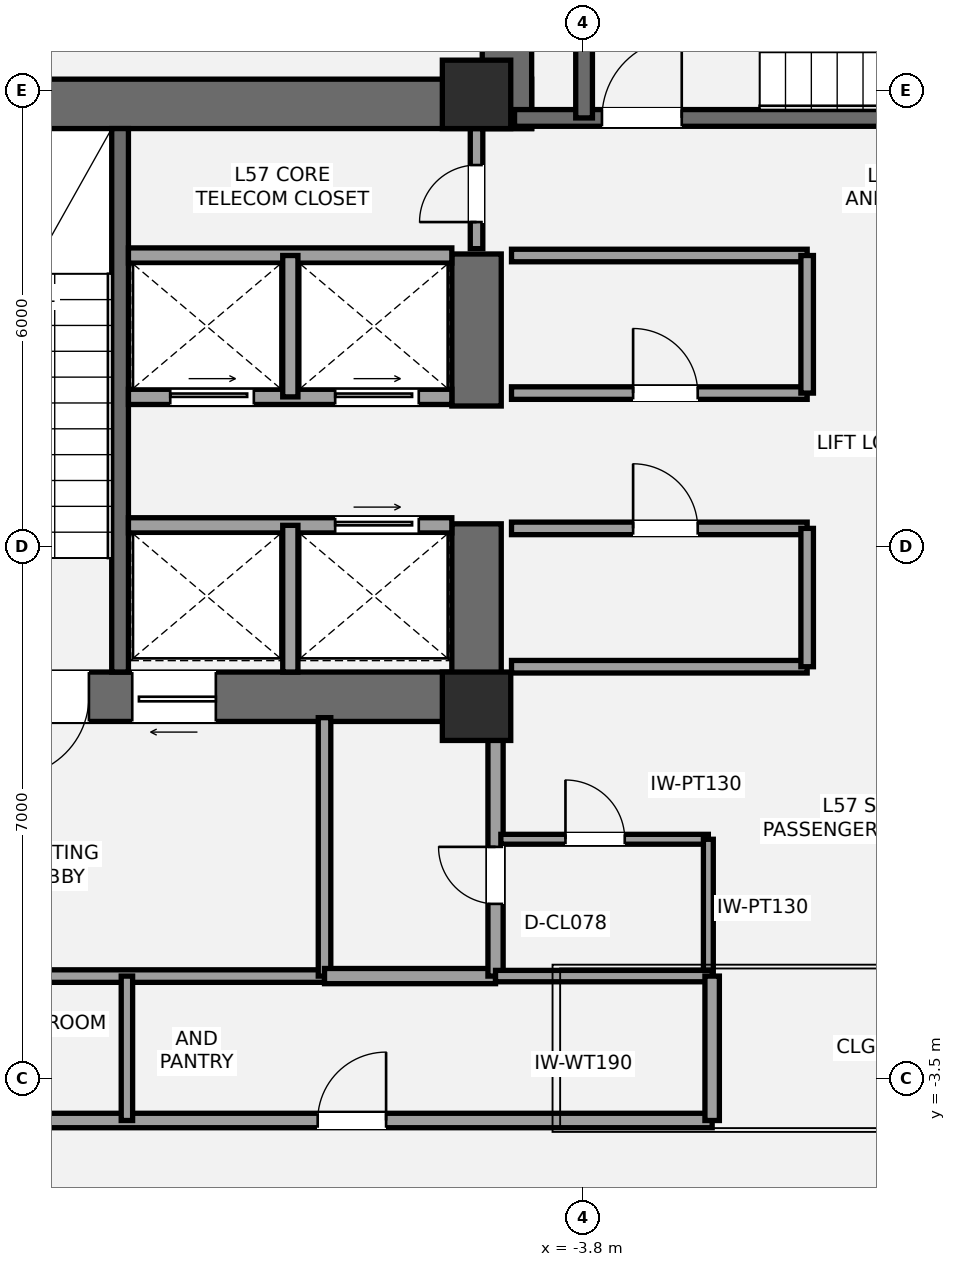
"""IFC4 building model, lengths in metres.
Left out: names, types, materials, properties, quantities, classifications, styles, units other than length and angle.
Written with IfcOpenShell. Run it as: python <this file> out.ifc"""

import sys

from ifc_helpers import new_model, si_unit, direction, frame, frame_2d, origin, origin_2d, place, context, subcontext, project, spatial, rectangle, extrude, element, fill, save


model = new_model("IFC4")
c1 = context("Model", 3, precision=1e-05, world=origin(), true_north=direction((0.0, 1.0)))
c2 = subcontext(c1, "Body", "Model", "MODEL_VIEW")
j1 = project(units=[si_unit("LENGTHUNIT", "METRE"), si_unit("PLANEANGLEUNIT", "RADIAN")], contexts=[c1])
p1 = place(None, origin())
s1 = spatial("IfcSite", under=j1, at=p1, CompositionType="ELEMENT")
p2 = place(p1, origin())
s2 = spatial("IfcBuilding", under=s1, at=p2, CompositionType="ELEMENT")
p3 = place(p2, frame((0.0, 0.0, 205.9)))
s3 = spatial("IfcBuildingStorey", under=s2, at=p3, CompositionType="ELEMENT", Elevation=205.9)
p4 = place(p3, frame((-13.8, 9.325, 0.0), z_axis=(0.0, 0.0, 1.0), x_axis=(1.0, 0.0, 0.0)))
e1 = element("IfcWall", 1, at=p4, inside=s3, PredefinedType="SHEAR", context=c2, shape_type="SweptSolid", body=[
    extrude(rectangle(XDim=9.325, YDim=0.65, at=frame_2d((4.663, 0.0))), origin(), (0.0, 0.0, 1.0), 4.1),
])
p5 = place(p3, frame((-4.875, 1.525, 0.0), z_axis=(0.0, 0.0, 1.0), x_axis=(-1.0, 0.0, 0.0)))
e2 = element("IfcWall", 2, at=p5, inside=s3, PredefinedType="SHEAR", context=c2, shape_type="SweptSolid", body=[
    extrude(rectangle(XDim=8.925, YDim=0.65, at=frame_2d((4.462, 0.0))), origin(), (0.0, 0.0, 1.0), 4.1),
])
p6 = place(p5, frame((5.425, 0.0, 0.0)))
e3 = element("IfcOpeningElement", 3, at=p6, cuts=e2, PredefinedType="OPENING", context=c2, shape_type="SweptSolid", body=[
    extrude(rectangle(XDim=1.05, YDim=2.15, at=frame_2d((0.525, 1.075))), frame((0.0, 0.335, 0.0), z_axis=(0.0, -1.0, 0.0), x_axis=(1.0, 0.0, 0.0)), (0.0, 0.0, 1.0), 0.67),
])
p7 = place(p5, frame((3.755, 0.0, 0.0)))
e4 = element("IfcOpeningElement", 4, at=p7, cuts=e2, PredefinedType="OPENING", context=c2, shape_type="SweptSolid", body=[
    extrude(rectangle(XDim=1.1, YDim=2.2, at=frame_2d((0.55, 1.1))), frame((0.0, 0.335, 0.0), z_axis=(0.0, -1.0, 0.0), x_axis=(1.0, 0.0, 0.0)), (0.0, 0.0, 1.0), 0.67),
])
p8 = place(p3, frame((-5.2, 1.2, 0.0), z_axis=(0.0, 0.0, 1.0), x_axis=(0.0, 1.0, 0.0)))
e5 = element("IfcWall", 5, at=p8, inside=s3, PredefinedType="SHEAR", context=c2, shape_type="SweptSolid", body=[
    extrude(rectangle(XDim=2.6, YDim=0.65, at=frame_2d((1.3, 0.0))), origin(), (0.0, 0.0, 1.0), 4.1),
])
p9 = place(p3, frame((-5.2, 5.35, 0.0), z_axis=(0.0, 0.0, 1.0), x_axis=(0.0, 1.0, 0.0)))
e6 = element("IfcWall", 6, at=p9, inside=s3, PredefinedType="SHEAR", context=c2, shape_type="SweptSolid", body=[
    extrude(rectangle(XDim=2.0, YDim=0.65, at=frame_2d((1.0, 0.0))), origin(), (0.0, 0.0, 1.0), 4.1),
])
p10 = place(p3, frame((-9.89, 1.85, 0.0), z_axis=(0.0, 0.0, 1.0), x_axis=(0.0, 1.0, 0.0)))
e7 = element("IfcWall", 7, at=p10, inside=s3, PredefinedType="SHEAR", context=c2, shape_type="SweptSolid", body=[
    extrude(rectangle(XDim=7.15, YDim=0.22, at=frame_2d((3.575, 0.0))), origin(), (0.0, 0.0, 1.0), 4.1),
])
p11 = place(p3, frame((-4.8, 9.0, 0.0), z_axis=(0.0, 0.0, 1.0), x_axis=(0.0, 1.0, 0.0)))
e8 = element("IfcWall", 8, at=p11, inside=s3, PredefinedType="SHEAR", context=c2, shape_type="SweptSolid", body=[
    extrude(rectangle(XDim=4.05, YDim=0.65, at=frame_2d((2.025, 0.0))), origin(), (0.0, 0.0, 1.0), 4.1),
])
p12 = place(p3, frame((-4.7, 9.14, 0.0), z_axis=(0.0, 0.0, 1.0), x_axis=(1.0, 0.0, 0.0)))
e9 = element("IfcWall", 9, at=p12, inside=s3, PredefinedType="SHEAR", context=c2, shape_type="SweptSolid", body=[
    extrude(rectangle(XDim=9.3, YDim=0.22, at=frame_2d((4.65, 0.0))), origin(), (0.0, 0.0, 1.0), 4.1),
])
p13 = place(p12, frame((1.15, 0.0, 0.0)))
e10 = element("IfcOpeningElement", 10, at=p13, cuts=e9, PredefinedType="OPENING", context=c2, shape_type="SweptSolid", body=[
    extrude(rectangle(XDim=1.05, YDim=2.15, at=frame_2d((0.525, 1.075))), frame((0.0, 0.12, 0.0), z_axis=(0.0, -1.0, 0.0), x_axis=(1.0, 0.0, 0.0)), (0.0, 0.0, 1.0), 0.24),
])
p14 = place(p3, frame((-3.785, 9.14, 0.0), z_axis=(0.0, 0.0, 1.0), x_axis=(0.0, 1.0, 0.0)))
e11 = element("IfcWall", 11, at=p14, inside=s3, PredefinedType="SHEAR", context=c2, shape_type="SweptSolid", body=[
    extrude(rectangle(XDim=3.26, YDim=0.22, at=frame_2d((1.63, 0.0))), origin(), (0.0, 0.0, 1.0), 4.1),
])
for number, where, z_axis, x_axis in (
    (12, (-5.2, 1.4, 0.0), (0.0, 0.0, 1.0), (1.0, 0.0, 0.0)),
    (13, (-5.2, 9.45, 0.0), (0.0, 0.0, 1.0), (1.0, 0.0, 0.0)),
):
    element("IfcColumn", number, at=place(p3, frame(where, z_axis=z_axis, x_axis=x_axis)), inside=s3, PredefinedType="COLUMN", context=c2, shape_type="SweptSolid", body=[
        extrude(rectangle(XDim=0.9, YDim=0.9, at=origin_2d()), origin(), (0.0, 0.0, 1.0), 4.1),
    ])
p15 = place(p3, frame((-13.45, -2.15, 0.0), z_axis=(0.0, 0.0, 1.0), x_axis=(1.0, 0.0, 0.0)))
e14 = element("IfcWall", 14, at=p15, inside=s3, PredefinedType="PARTITIONING", context=c2, shape_type="SweptSolid", body=[
    extrude(rectangle(XDim=6.25, YDim=0.165, at=frame_2d((3.125, 0.0))), origin(), (0.0, 0.0, 1.0), 3.373),
])
p16 = place(p3, frame((-7.2, -2.15, 0.0), z_axis=(0.0, 0.0, 1.0), x_axis=(0.0, 1.0, 0.0)))
e15 = element("IfcWall", 15, at=p16, inside=s3, PredefinedType="PARTITIONING", context=c2, shape_type="SweptSolid", body=[
    extrude(rectangle(XDim=3.4, YDim=0.165, at=frame_2d((1.7, 0.0))), origin(), (0.0, 0.0, 1.0), 3.373),
])
p17 = place(p3, frame((-7.2, -2.15, 0.0), z_axis=(0.0, 0.0, 1.0), x_axis=(1.0, 0.0, 0.0)))
e16 = element("IfcWall", 16, at=p17, inside=s3, PredefinedType="SOLIDWALL", context=c2, shape_type="SweptSolid", body=[
    extrude(rectangle(XDim=2.25, YDim=0.2, at=frame_2d((1.125, 0.0))), origin(), (0.0, 0.0, 1.0), 3.373),
])
p18 = place(p3, frame((-4.95, -2.15, 0.0), z_axis=(0.0, 0.0, 1.0), x_axis=(0.0, 1.0, 0.0)))
e17 = element("IfcWall", 17, at=p18, inside=s3, PredefinedType="SOLIDWALL", context=c2, shape_type="SweptSolid", body=[
    extrude(rectangle(XDim=3.4, YDim=0.2, at=frame_2d((1.7, 0.0))), origin(), (0.0, 0.0, 1.0), 3.373),
])
p19 = place(p18, frame((0.95, 0.0, 0.0)))
e18 = element("IfcOpeningElement", 18, at=p19, cuts=e17, PredefinedType="OPENING", context=c2, shape_type="SweptSolid", body=[
    extrude(rectangle(XDim=0.75, YDim=2.1, at=frame_2d((0.375, 1.05))), frame((0.0, 0.11, 0.0), z_axis=(0.0, -1.0, 0.0), x_axis=(1.0, 0.0, 0.0)), (0.0, 0.0, 1.0), 0.22),
])
p20 = place(p3, frame((-4.88, -0.35, 0.0), z_axis=(0.0, 0.0, 1.0), x_axis=(1.0, 0.0, 0.0)))
e19 = element("IfcWall", 19, at=p20, inside=s3, PredefinedType="PARTITIONING", context=c2, shape_type="SweptSolid", body=[
    extrude(rectangle(XDim=2.73, YDim=0.13, at=frame_2d((1.365, 0.0))), origin(), (0.0, 0.0, 1.0), 3.373),
])
p21 = place(p20, frame((0.85, 0.0, 0.0)))
e20 = element("IfcOpeningElement", 20, at=p21, cuts=e19, PredefinedType="OPENING", context=c2, shape_type="SweptSolid", body=[
    extrude(rectangle(XDim=0.78, YDim=2.1, at=frame_2d((0.39, 1.05))), frame((0.0, 0.075, 0.0), z_axis=(0.0, -1.0, 0.0), x_axis=(1.0, 0.0, 0.0)), (0.0, 0.0, 1.0), 0.15),
])
p22 = place(p3, frame((-2.15, -2.15, 0.0), z_axis=(0.0, 0.0, 1.0), x_axis=(0.0, 1.0, 0.0)))
e21 = element("IfcWall", 21, at=p22, inside=s3, PredefinedType="PARTITIONING", context=c2, shape_type="SweptSolid", body=[
    extrude(rectangle(XDim=1.8, YDim=0.13, at=frame_2d((0.9, 0.0))), origin(), (0.0, 0.0, 1.0), 3.92),
])
p23 = place(p3, frame((-9.78, 3.78, 0.0), z_axis=(0.0, 0.0, 1.0), x_axis=(1.0, 0.0, 0.0)))
e22 = element("IfcWall", 22, at=p23, inside=s3, PredefinedType="SOLIDWALL", context=c2, shape_type="SweptSolid", body=[
    extrude(rectangle(XDim=4.255, YDim=0.2, at=frame_2d((2.127, 0.0))), origin(), (0.0, 0.0, 1.0), 3.92),
])
p24 = place(p23, frame((2.72, 0.0, 0.0)))
e23 = element("IfcOpeningElement", 23, at=p24, cuts=e22, PredefinedType="OPENING", context=c2, shape_type="SweptSolid", body=[
    extrude(rectangle(XDim=1.1, YDim=2.2, at=frame_2d((0.55, 1.1))), frame((0.0, 0.11, 0.0), z_axis=(0.0, -1.0, 0.0), x_axis=(1.0, 0.0, 0.0)), (0.0, 0.0, 1.0), 0.22),
])
p25 = place(p3, frame((-7.65, 1.85, 0.0), z_axis=(0.0, 0.0, 1.0), x_axis=(0.0, 1.0, 0.0)))
e24 = element("IfcWall", 24, at=p25, inside=s3, PredefinedType="SOLIDWALL", context=c2, shape_type="SweptSolid", body=[
    extrude(rectangle(XDim=1.93, YDim=0.2, at=frame_2d((0.965, 0.0))), origin(), (0.0, 0.0, 1.0), 3.92),
])
p26 = place(p3, frame((-9.78, 5.47, 0.0), z_axis=(0.0, 0.0, 1.0), x_axis=(1.0, 0.0, 0.0)))
e25 = element("IfcWall", 25, at=p26, inside=s3, PredefinedType="SOLIDWALL", context=c2, shape_type="SweptSolid", body=[
    extrude(rectangle(XDim=4.255, YDim=0.2, at=frame_2d((2.127, 0.0))), origin(), (0.0, 0.0, 1.0), 3.92),
])
p27 = place(p26, frame((0.55, 0.0, 0.0)))
e26 = element("IfcOpeningElement", 26, at=p27, cuts=e25, PredefinedType="OPENING", context=c2, shape_type="SweptSolid", body=[
    extrude(rectangle(XDim=1.1, YDim=2.2, at=frame_2d((0.55, 1.1))), frame((0.0, 0.11, 0.0), z_axis=(0.0, -1.0, 0.0), x_axis=(1.0, 0.0, 0.0)), (0.0, 0.0, 1.0), 0.22),
])
p28 = place(p26, frame((2.72, 0.0, 0.0)))
e27 = element("IfcOpeningElement", 27, at=p28, cuts=e25, PredefinedType="OPENING", context=c2, shape_type="SweptSolid", body=[
    extrude(rectangle(XDim=1.1, YDim=2.2, at=frame_2d((0.55, 1.1))), frame((0.0, 0.11, 0.0), z_axis=(0.0, -1.0, 0.0), x_axis=(1.0, 0.0, 0.0)), (0.0, 0.0, 1.0), 0.22),
])
p29 = place(p3, frame((-9.78, 7.33, 0.0), z_axis=(0.0, 0.0, 1.0), x_axis=(1.0, 0.0, 0.0)))
e28 = element("IfcWall", 28, at=p29, inside=s3, PredefinedType="SOLIDWALL", context=c2, shape_type="SweptSolid", body=[
    extrude(rectangle(XDim=4.255, YDim=0.2, at=frame_2d((2.127, 0.0))), origin(), (0.0, 0.0, 1.0), 3.92),
])
p30 = place(p3, frame((-7.65, 5.47, 0.0), z_axis=(0.0, 0.0, 1.0), x_axis=(0.0, 1.0, 0.0)))
e29 = element("IfcWall", 29, at=p30, inside=s3, PredefinedType="SOLIDWALL", context=c2, shape_type="SweptSolid", body=[
    extrude(rectangle(XDim=1.86, YDim=0.2, at=frame_2d((0.93, 0.0))), origin(), (0.0, 0.0, 1.0), 3.92),
])
p31 = place(p3, frame((-4.74, 1.92, 0.0), z_axis=(0.0, 0.0, 1.0), x_axis=(1.0, 0.0, 0.0)))
e30 = element("IfcWall", 30, at=p31, inside=s3, PredefinedType="PARTITIONING", context=c2, shape_type="SweptSolid", body=[
    extrude(rectangle(XDim=3.89, YDim=0.165, at=frame_2d((1.945, 0.0))), origin(), (0.0, 0.0, 1.0), 3.06),
])
p32 = place(p3, frame((-4.74, 3.74, 0.0), z_axis=(0.0, 0.0, 1.0), x_axis=(1.0, 0.0, 0.0)))
e31 = element("IfcWall", 31, at=p32, inside=s3, PredefinedType="PARTITIONING", context=c2, shape_type="SweptSolid", body=[
    extrude(rectangle(XDim=3.89, YDim=0.165, at=frame_2d((1.945, 0.0))), origin(), (0.0, 0.0, 1.0), 3.92),
])
p33 = place(p32, frame((1.6, 0.0, 0.0)))
e32 = element("IfcOpeningElement", 32, at=p33, cuts=e31, PredefinedType="OPENING", context=c2, shape_type="SweptSolid", body=[
    extrude(rectangle(XDim=0.85, YDim=2.1, at=frame_2d((0.425, 1.05))), frame((0.0, 0.093, 0.0), z_axis=(0.0, -1.0, 0.0), x_axis=(1.0, 0.0, 0.0)), (0.0, 0.0, 1.0), 0.185),
])
p34 = place(p3, frame((-0.85, 1.92, 0.0), z_axis=(0.0, 0.0, 1.0), x_axis=(0.0, 1.0, 0.0)))
e33 = element("IfcWall", 33, at=p34, inside=s3, PredefinedType="PARTITIONING", context=c2, shape_type="SweptSolid", body=[
    extrude(rectangle(XDim=1.82, YDim=0.165, at=frame_2d((0.91, 0.0))), origin(), (0.0, 0.0, 1.0), 3.92),
])
p35 = place(p3, frame((-4.74, 5.52, 0.0), z_axis=(0.0, 0.0, 1.0), x_axis=(1.0, 0.0, 0.0)))
e34 = element("IfcWall", 34, at=p35, inside=s3, PredefinedType="PARTITIONING", context=c2, shape_type="SweptSolid", body=[
    extrude(rectangle(XDim=3.89, YDim=0.165, at=frame_2d((1.945, 0.0))), origin(), (0.0, 0.0, 1.0), 3.92),
])
p36 = place(p35, frame((1.6, 0.0, 0.0)))
e35 = element("IfcOpeningElement", 35, at=p36, cuts=e34, PredefinedType="OPENING", context=c2, shape_type="SweptSolid", body=[
    extrude(rectangle(XDim=0.85, YDim=2.1, at=frame_2d((0.425, 1.05))), frame((0.0, 0.093, 0.0), z_axis=(0.0, -1.0, 0.0), x_axis=(1.0, 0.0, 0.0)), (0.0, 0.0, 1.0), 0.185),
])
p37 = place(p3, frame((-4.74, 7.33, 0.0), z_axis=(0.0, 0.0, 1.0), x_axis=(1.0, 0.0, 0.0)))
e36 = element("IfcWall", 36, at=p37, inside=s3, PredefinedType="PARTITIONING", context=c2, shape_type="SweptSolid", body=[
    extrude(rectangle(XDim=3.89, YDim=0.165, at=frame_2d((1.945, 0.0))), origin(), (0.0, 0.0, 1.0), 3.92),
])
p38 = place(p3, frame((-0.85, 5.52, 0.0), z_axis=(0.0, 0.0, 1.0), x_axis=(0.0, 1.0, 0.0)))
e37 = element("IfcWall", 37, at=p38, inside=s3, PredefinedType="PARTITIONING", context=c2, shape_type="SweptSolid", body=[
    extrude(rectangle(XDim=1.81, YDim=0.165, at=frame_2d((0.905, 0.0))), origin(), (0.0, 0.0, 1.0), 3.92),
])
p39 = place(p3, frame((-5.2, 7.42, 0.0), z_axis=(0.0, 0.0, 1.0), x_axis=(0.0, 1.0, 0.0)))
e38 = element("IfcWall", 38, at=p39, inside=s3, PredefinedType="PARTITIONING", context=c2, shape_type="SweptSolid", body=[
    extrude(rectangle(XDim=1.58, YDim=0.165, at=frame_2d((0.79, 0.0))), origin(), (0.0, 0.0, 1.0), 3.92),
])
p40 = place(p39, frame((0.35, 0.0, 0.0)))
e39 = element("IfcOpeningElement", 39, at=p40, cuts=e38, PredefinedType="OPENING", context=c2, shape_type="SweptSolid", body=[
    extrude(rectangle(XDim=0.75, YDim=2.1, at=frame_2d((0.375, 1.05))), frame((0.0, 0.093, 0.0), z_axis=(0.0, -1.0, 0.0), x_axis=(1.0, 0.0, 0.0)), (0.0, 0.0, 1.0), 0.185),
])
p41 = place(p3, frame((-13.45, -4.05, 0.0), z_axis=(0.0, 0.0, 1.0), x_axis=(1.0, 0.0, 0.0)))
e40 = element("IfcWall", 40, at=p41, inside=s3, PredefinedType="PLUMBINGWALL", context=c2, shape_type="SweptSolid", body=[
    extrude(rectangle(XDim=11.35, YDim=0.19, at=frame_2d((5.675, 0.0))), origin(), (0.0, 0.0, 1.0), 3.307),
])
p42 = place(p41, frame((1.25, 0.0, 0.0)))
e41 = element("IfcOpeningElement", 41, at=p42, cuts=e40, PredefinedType="OPENING", context=c2, shape_type="SweptSolid", body=[
    extrude(rectangle(XDim=0.95, YDim=2.15, at=frame_2d((0.475, 1.075))), frame((0.0, 0.105, 0.0), z_axis=(0.0, -1.0, 0.0), x_axis=(1.0, 0.0, 0.0)), (0.0, 0.0, 1.0), 0.21),
])
p43 = place(p41, frame((6.16, 0.0, 0.0)))
e42 = element("IfcOpeningElement", 42, at=p43, cuts=e40, PredefinedType="OPENING", context=c2, shape_type="SweptSolid", body=[
    extrude(rectangle(XDim=0.9, YDim=2.1, at=frame_2d((0.45, 1.05))), frame((0.0, 0.105, 0.0), z_axis=(0.0, -1.0, 0.0), x_axis=(1.0, 0.0, 0.0)), (0.0, 0.0, 1.0), 0.21),
])
p44 = place(p3, frame((-4.95, -2.15, 0.0), z_axis=(0.0, 0.0, 1.0), x_axis=(1.0, 0.0, 0.0)))
e43 = element("IfcWall", 43, at=p44, inside=s3, PredefinedType="PLUMBINGWALL", context=c2, shape_type="SweptSolid", body=[
    extrude(rectangle(XDim=2.85, YDim=0.15, at=frame_2d((1.425, 0.0))), origin(), (0.0, 0.0, 1.0), 3.373),
])
p45 = place(p3, frame((-2.1, -4.05, 0.0), z_axis=(0.0, 0.0, 1.0), x_axis=(0.0, 1.0, 0.0)))
e44 = element("IfcWall", 44, at=p45, inside=s3, PredefinedType="PLUMBINGWALL", context=c2, shape_type="SweptSolid", body=[
    extrude(rectangle(XDim=1.9, YDim=0.19, at=frame_2d((0.95, 0.0))), origin(), (0.0, 0.0, 1.0), 3.373),
])
p46 = place(p3, frame((-9.8, -4.05, 0.0), z_axis=(0.0, 0.0, 1.0), x_axis=(0.0, 1.0, 0.0)))
e45 = element("IfcWall", 45, at=p46, inside=s3, PredefinedType="PLUMBINGWALL", context=c2, shape_type="SweptSolid", body=[
    extrude(rectangle(XDim=1.9, YDim=0.15, at=frame_2d((0.95, 0.0))), origin(), (0.0, 0.0, 1.0), 3.92),
])
p47 = place(p6, origin())
e46 = element("IfcDoor", 46, at=p47, inside=s3, OperationType="SINGLE_SWING_RIGHT", PredefinedType="DOOR", context=c2, shape_type="SweptSolid", body=[
    extrude(rectangle(XDim=1.05, YDim=2.15, at=frame_2d((0.525, 1.075))), frame((0.0, 0.025, 0.0), z_axis=(0.0, -1.0, 0.0), x_axis=(1.0, 0.0, 0.0)), (0.0, 0.0, 1.0), 0.05),
])
fill(e3, e46)
p48 = place(p13, origin())
e47 = element("IfcDoor", 47, at=p48, inside=s3, OperationType="SINGLE_SWING_RIGHT", PredefinedType="DOOR", context=c2, shape_type="SweptSolid", body=[
    extrude(rectangle(XDim=1.05, YDim=2.15, at=frame_2d((0.525, 1.075))), frame((0.0, 0.025, 0.0), z_axis=(0.0, -1.0, 0.0), x_axis=(1.0, 0.0, 0.0)), (0.0, 0.0, 1.0), 0.05),
])
fill(e10, e47)
p49 = place(p19, origin())
e48 = element("IfcDoor", 48, at=p49, inside=s3, OperationType="SINGLE_SWING_RIGHT", PredefinedType="DOOR", context=c2, shape_type="SweptSolid", body=[
    extrude(rectangle(XDim=0.75, YDim=2.1, at=frame_2d((0.375, 1.05))), frame((0.0, 0.025, 0.0), z_axis=(0.0, -1.0, 0.0), x_axis=(1.0, 0.0, 0.0)), (0.0, 0.0, 1.0), 0.05),
])
fill(e18, e48)
p50 = place(p21, origin())
e49 = element("IfcDoor", 49, at=p50, inside=s3, OperationType="SINGLE_SWING_LEFT", PredefinedType="DOOR", context=c2, shape_type="SweptSolid", body=[
    extrude(rectangle(XDim=0.78, YDim=2.1, at=frame_2d((0.39, 1.05))), frame((0.0, 0.025, 0.0), z_axis=(0.0, -1.0, 0.0), x_axis=(1.0, 0.0, 0.0)), (0.0, 0.0, 1.0), 0.05),
])
fill(e20, e49)
p51 = place(p7, origin())
e50 = element("IfcDoor", 50, at=p51, inside=s3, OperationType="SLIDING_TO_LEFT", PredefinedType="DOOR", context=c2, shape_type="SweptSolid", body=[
    extrude(rectangle(XDim=1.1, YDim=2.2, at=frame_2d((0.55, 1.1))), frame((0.0, 0.025, 0.0), z_axis=(0.0, -1.0, 0.0), x_axis=(1.0, 0.0, 0.0)), (0.0, 0.0, 1.0), 0.05),
])
fill(e4, e50)
p52 = place(p27, origin())
e51 = element("IfcDoor", 51, at=p52, inside=s3, OperationType="SLIDING_TO_LEFT", PredefinedType="DOOR", context=c2, shape_type="SweptSolid", body=[
    extrude(rectangle(XDim=1.1, YDim=2.2, at=frame_2d((0.55, 1.1))), frame((0.0, 0.025, 0.0), z_axis=(0.0, -1.0, 0.0), x_axis=(1.0, 0.0, 0.0)), (0.0, 0.0, 1.0), 0.05),
])
fill(e26, e51)
p53 = place(p28, origin())
e52 = element("IfcDoor", 52, at=p53, inside=s3, OperationType="SLIDING_TO_LEFT", PredefinedType="DOOR", context=c2, shape_type="SweptSolid", body=[
    extrude(rectangle(XDim=1.1, YDim=2.2, at=frame_2d((0.55, 1.1))), frame((0.0, 0.025, 0.0), z_axis=(0.0, -1.0, 0.0), x_axis=(1.0, 0.0, 0.0)), (0.0, 0.0, 1.0), 0.05),
])
fill(e27, e52)
p54 = place(p24, origin())
e53 = element("IfcDoor", 53, at=p54, inside=s3, OperationType="SLIDING_TO_LEFT", PredefinedType="DOOR", context=c2, shape_type="SweptSolid", body=[
    extrude(rectangle(XDim=1.1, YDim=2.2, at=frame_2d((0.55, 1.1))), frame((0.0, 0.025, 0.0), z_axis=(0.0, -1.0, 0.0), x_axis=(1.0, 0.0, 0.0)), (0.0, 0.0, 1.0), 0.05),
])
fill(e23, e53)
p55 = place(p33, origin())
e54 = element("IfcDoor", 54, at=p55, inside=s3, OperationType="SINGLE_SWING_LEFT", PredefinedType="DOOR", context=c2, shape_type="SweptSolid", body=[
    extrude(rectangle(XDim=0.85, YDim=2.1, at=frame_2d((0.425, 1.05))), frame((0.0, 0.025, 0.0), z_axis=(0.0, -1.0, 0.0), x_axis=(1.0, 0.0, 0.0)), (0.0, 0.0, 1.0), 0.05),
])
fill(e32, e54)
p56 = place(p36, origin())
e55 = element("IfcDoor", 55, at=p56, inside=s3, OperationType="SINGLE_SWING_LEFT", PredefinedType="DOOR", context=c2, shape_type="SweptSolid", body=[
    extrude(rectangle(XDim=0.85, YDim=2.1, at=frame_2d((0.425, 1.05))), frame((0.0, 0.025, 0.0), z_axis=(0.0, -1.0, 0.0), x_axis=(1.0, 0.0, 0.0)), (0.0, 0.0, 1.0), 0.05),
])
fill(e35, e55)
p57 = place(p40, origin())
e56 = element("IfcDoor", 56, at=p57, inside=s3, OperationType="SINGLE_SWING_LEFT", PredefinedType="DOOR", context=c2, shape_type="SweptSolid", body=[
    extrude(rectangle(XDim=0.75, YDim=2.1, at=frame_2d((0.375, 1.05))), frame((0.0, 0.025, 0.0), z_axis=(0.0, -1.0, 0.0), x_axis=(1.0, 0.0, 0.0)), (0.0, 0.0, 1.0), 0.05),
])
fill(e39, e56)
p58 = place(p43, origin())
e57 = element("IfcDoor", 57, at=p58, inside=s3, OperationType="SINGLE_SWING_RIGHT", PredefinedType="DOOR", context=c2, shape_type="SweptSolid", body=[
    extrude(rectangle(XDim=0.9, YDim=2.1, at=frame_2d((0.45, 1.05))), frame((0.0, 0.025, 0.0), z_axis=(0.0, -1.0, 0.0), x_axis=(1.0, 0.0, 0.0)), (0.0, 0.0, 1.0), 0.05),
])
fill(e42, e57)
save(model, sys.argv[1])
